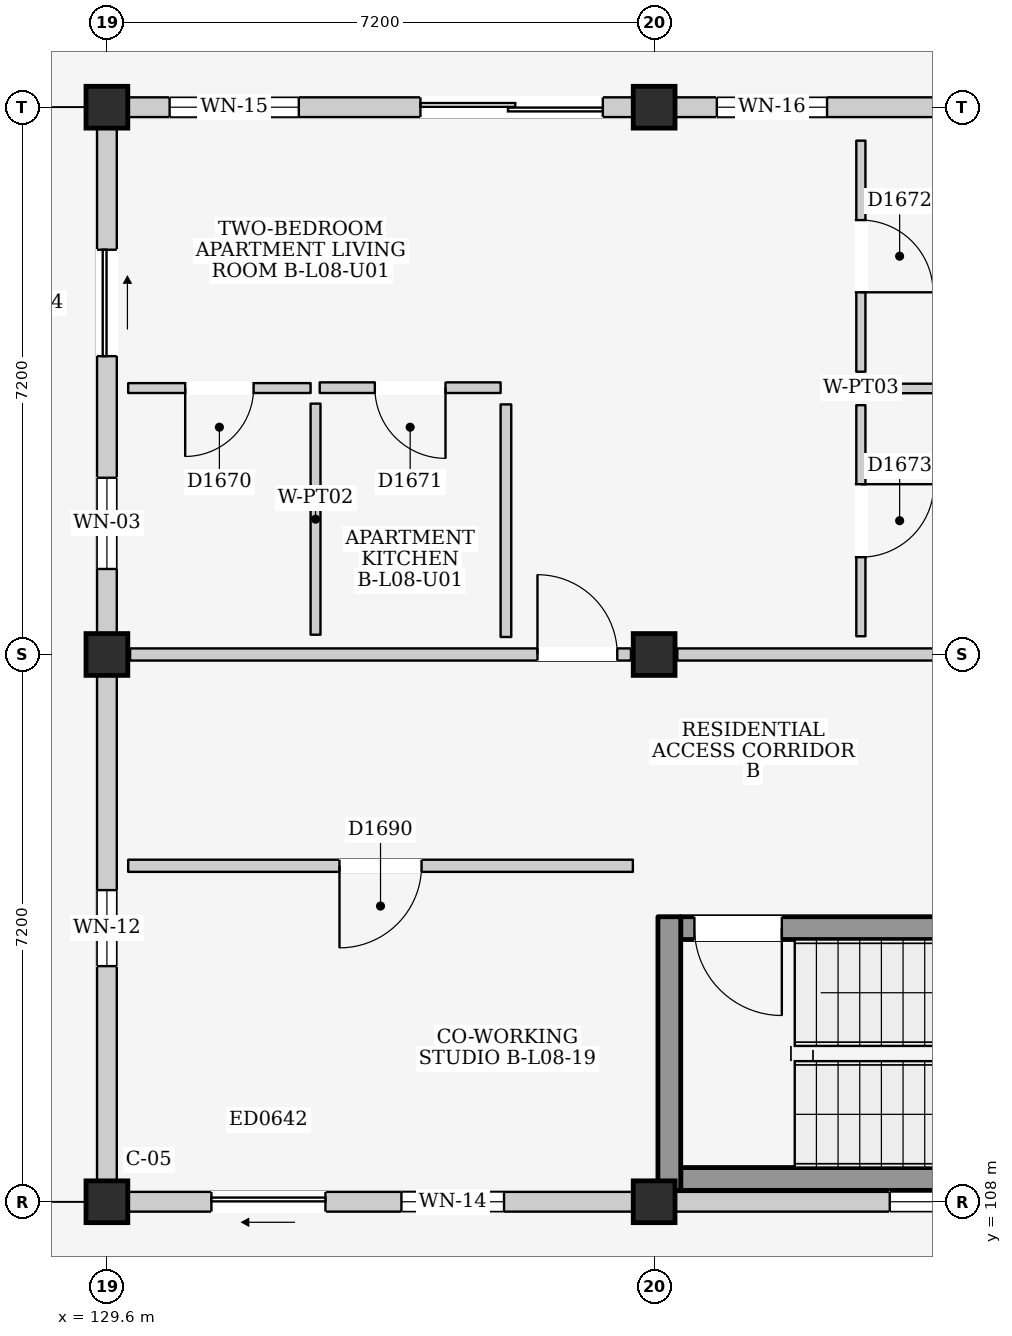
"""IFC4 building model, lengths in metres.
Left out: names, types, materials, properties, quantities, classifications, styles, units other than length and angle.
Written with IfcOpenShell. Run it as: python <this file> out.ifc"""

import sys

from ifc_helpers import new_model, si_unit, direction, frame, frame_2d, origin, origin_2d, place, context, subcontext, project, spatial, rectangle, extrude, element, fill, save


model = new_model("IFC4")
c1 = context("Model", 3, precision=1e-05, world=origin(), true_north=direction((0.0, 1.0)))
c2 = subcontext(c1, "Body", "Model", "MODEL_VIEW")
j1 = project(units=[si_unit("LENGTHUNIT", "METRE"), si_unit("PLANEANGLEUNIT", "RADIAN")], contexts=[c1])
p1 = place(None, origin())
s1 = spatial("IfcSite", under=j1, at=p1, CompositionType="ELEMENT")
p2 = place(p1, origin())
s2 = spatial("IfcBuilding", under=s1, at=p2, CompositionType="ELEMENT")
p3 = place(p2, frame((0.0, 0.0, 28.3)))
s3 = spatial("IfcBuildingStorey", under=s2, at=p3, CompositionType="ELEMENT", Elevation=28.3)
for number, where, z_axis, x_axis in (
    (1, (129.6, 108.0, 0.0), (0.0, 0.0, 1.0), (1.0, 0.0, 0.0)),
    (2, (129.6, 115.2, 0.0), (0.0, 0.0, 1.0), (1.0, 0.0, 0.0)),
    (3, (129.6, 122.4, 0.0), (0.0, 0.0, 1.0), (1.0, 0.0, 0.0)),
    (4, (136.8, 108.0, 0.0), (0.0, 0.0, 1.0), (1.0, 0.0, 0.0)),
    (5, (136.8, 115.2, 0.0), (0.0, 0.0, 1.0), (1.0, 0.0, 0.0)),
    (6, (136.8, 122.4, 0.0), (0.0, 0.0, 1.0), (1.0, 0.0, 0.0)),
):
    element("IfcColumn", number, at=place(p3, frame(where, z_axis=z_axis, x_axis=x_axis)), inside=s3, PredefinedType="COLUMN", context=c2, shape_type="SweptSolid", body=[
        extrude(rectangle(XDim=0.55, YDim=0.55, at=origin_2d()), origin(), (0.0, 0.0, 1.0), 3.2),
    ])
p4 = place(p3, frame((129.875, 108.0, 0.0), z_axis=(0.0, 0.0, 1.0), x_axis=(1.0, 0.0, 0.0)))
e7 = element("IfcWall", 7, at=p4, inside=s3, PredefinedType="ELEMENTEDWALL", context=c2, shape_type="SweptSolid", body=[
    extrude(rectangle(XDim=6.65, YDim=0.26, at=frame_2d((3.325, 0.0))), origin(), (0.0, 0.0, 1.0), 2.335),
])
p5 = place(p4, frame((1.1, 0.0, 0.0)))
e8 = element("IfcOpeningElement", 8, at=p5, cuts=e7, PredefinedType="OPENING", context=c2, shape_type="SweptSolid", body=[
    extrude(rectangle(XDim=1.5, YDim=2.12, at=frame_2d((0.75, 1.06))), frame((0.0, 0.145, 0.0), z_axis=(0.0, -1.0, 0.0), x_axis=(1.0, 0.0, 0.0)), (0.0, 0.0, 1.0), 0.29),
])
p6 = place(p4, frame((3.6, 0.0, 0.725)))
e9 = element("IfcOpeningElement", 9, at=p6, cuts=e7, PredefinedType="OPENING", context=c2, shape_type="SweptSolid", body=[
    extrude(rectangle(XDim=1.35, YDim=1.5, at=frame_2d((0.675, 0.75))), frame((0.0, 0.145, 0.0), z_axis=(0.0, -1.0, 0.0), x_axis=(1.0, 0.0, 0.0)), (0.0, 0.0, 1.0), 0.29),
])
p7 = place(p3, frame((129.6, 108.275, 0.0), z_axis=(0.0, 0.0, 1.0), x_axis=(0.0, 1.0, 0.0)))
e10 = element("IfcWall", 10, at=p7, inside=s3, PredefinedType="ELEMENTEDWALL", context=c2, shape_type="SweptSolid", body=[
    extrude(rectangle(XDim=6.65, YDim=0.26, at=frame_2d((3.325, 0.0))), origin(), (0.0, 0.0, 1.0), 2.435),
])
p8 = place(p7, frame((2.825, 0.0, 1.1)))
e11 = element("IfcOpeningElement", 11, at=p8, cuts=e10, PredefinedType="OPENING", context=c2, shape_type="SweptSolid", body=[
    extrude(rectangle(XDim=1.0, YDim=0.9, at=frame_2d((0.5, 0.45))), frame((0.0, 0.145, 0.0), z_axis=(0.0, -1.0, 0.0), x_axis=(1.0, 0.0, 0.0)), (0.0, 0.0, 1.0), 0.29),
])
p9 = place(p3, frame((129.875, 122.4, 0.0), z_axis=(0.0, 0.0, 1.0), x_axis=(1.0, 0.0, 0.0)))
e12 = element("IfcWall", 12, at=p9, inside=s3, PredefinedType="ELEMENTEDWALL", context=c2, shape_type="SweptSolid", body=[
    extrude(rectangle(XDim=6.65, YDim=0.26, at=frame_2d((3.325, 0.0))), origin(), (0.0, 0.0, 1.0), 2.485),
])
p10 = place(p9, frame((3.85, 0.0, 0.0)))
e13 = element("IfcOpeningElement", 13, at=p10, cuts=e12, PredefinedType="OPENING", context=c2, shape_type="SweptSolid", body=[
    extrude(rectangle(XDim=2.4, YDim=2.12, at=frame_2d((1.2, 1.06))), frame((0.0, 0.145, 0.0), z_axis=(0.0, -1.0, 0.0), x_axis=(1.0, 0.0, 0.0)), (0.0, 0.0, 1.0), 0.29),
])
p11 = place(p9, frame((0.55, 0.0, 0.9)))
e14 = element("IfcOpeningElement", 14, at=p11, cuts=e12, PredefinedType="OPENING", context=c2, shape_type="SweptSolid", body=[
    extrude(rectangle(XDim=1.7, YDim=1.45, at=frame_2d((0.85, 0.725))), frame((0.0, 0.145, 0.0), z_axis=(0.0, -1.0, 0.0), x_axis=(1.0, 0.0, 0.0)), (0.0, 0.0, 1.0), 0.29),
])
p12 = place(p3, frame((129.6, 115.475, 0.0), z_axis=(0.0, 0.0, 1.0), x_axis=(0.0, 1.0, 0.0)))
e15 = element("IfcWall", 15, at=p12, inside=s3, PredefinedType="ELEMENTEDWALL", context=c2, shape_type="SweptSolid", body=[
    extrude(rectangle(XDim=6.65, YDim=0.26, at=frame_2d((3.325, 0.0))), origin(), (0.0, 0.0, 1.0), 2.435),
])
p13 = place(p12, frame((3.65, 0.0, 0.0)))
e16 = element("IfcOpeningElement", 16, at=p13, cuts=e15, PredefinedType="OPENING", context=c2, shape_type="SweptSolid", body=[
    extrude(rectangle(XDim=1.4, YDim=2.1, at=frame_2d((0.7, 1.05))), frame((0.0, 0.145, 0.0), z_axis=(0.0, -1.0, 0.0), x_axis=(1.0, 0.0, 0.0)), (0.0, 0.0, 1.0), 0.29),
])
p14 = place(p12, frame((0.85, 0.0, 0.95)))
e17 = element("IfcOpeningElement", 17, at=p14, cuts=e15, PredefinedType="OPENING", context=c2, shape_type="SweptSolid", body=[
    extrude(rectangle(XDim=1.2, YDim=1.35, at=frame_2d((0.6, 0.675))), frame((0.0, 0.145, 0.0), z_axis=(0.0, -1.0, 0.0), x_axis=(1.0, 0.0, 0.0)), (0.0, 0.0, 1.0), 0.29),
])
p15 = place(p3, frame((137.075, 108.0, 0.0), z_axis=(0.0, 0.0, 1.0), x_axis=(1.0, 0.0, 0.0)))
e18 = element("IfcWall", 18, at=p15, inside=s3, PredefinedType="ELEMENTEDWALL", context=c2, shape_type="SweptSolid", body=[
    extrude(rectangle(XDim=6.65, YDim=0.26, at=frame_2d((3.325, 0.0))), origin(), (0.0, 0.0, 1.0), 2.335),
])
p16 = place(p15, frame((2.825, 0.0, 1.2)))
e19 = element("IfcOpeningElement", 19, at=p16, cuts=e18, PredefinedType="OPENING", context=c2, shape_type="SweptSolid", body=[
    extrude(rectangle(XDim=1.0, YDim=0.9, at=frame_2d((0.5, 0.45))), frame((0.0, 0.145, 0.0), z_axis=(0.0, -1.0, 0.0), x_axis=(1.0, 0.0, 0.0)), (0.0, 0.0, 1.0), 0.29),
])
p17 = place(p3, frame((137.075, 122.4, 0.0), z_axis=(0.0, 0.0, 1.0), x_axis=(1.0, 0.0, 0.0)))
e20 = element("IfcWall", 20, at=p17, inside=s3, PredefinedType="ELEMENTEDWALL", context=c2, shape_type="SweptSolid", body=[
    extrude(rectangle(XDim=6.65, YDim=0.26, at=frame_2d((3.325, 0.0))), origin(), (0.0, 0.0, 1.0), 2.485),
])
p18 = place(p17, frame((3.85, 0.0, 0.0)))
e21 = element("IfcOpeningElement", 21, at=p18, cuts=e20, PredefinedType="OPENING", context=c2, shape_type="SweptSolid", body=[
    extrude(rectangle(XDim=2.0, YDim=2.12, at=frame_2d((1.0, 1.06))), frame((0.0, 0.145, 0.0), z_axis=(0.0, -1.0, 0.0), x_axis=(1.0, 0.0, 0.0)), (0.0, 0.0, 1.0), 0.29),
])
p19 = place(p17, frame((0.55, 0.0, 0.9)))
e22 = element("IfcOpeningElement", 22, at=p19, cuts=e20, PredefinedType="OPENING", context=c2, shape_type="SweptSolid", body=[
    extrude(rectangle(XDim=1.45, YDim=1.4, at=frame_2d((0.725, 0.7))), frame((0.0, 0.145, 0.0), z_axis=(0.0, -1.0, 0.0), x_axis=(1.0, 0.0, 0.0)), (0.0, 0.0, 1.0), 0.29),
])
p20 = place(p3, frame((137.15, 108.3, 0.0), z_axis=(0.0, 0.0, 1.0), x_axis=(1.0, 0.0, 0.0)))
e23 = element("IfcWall", 23, at=p20, inside=s3, PredefinedType="SHEAR", context=c2, shape_type="SweptSolid", body=[
    extrude(rectangle(XDim=6.5, YDim=0.3, at=frame_2d((3.25, 0.0))), origin(), (0.0, 0.0, 1.0), 2.95),
])
p21 = place(p3, frame((137.15, 111.6, 0.0), z_axis=(0.0, 0.0, 1.0), x_axis=(1.0, 0.0, 0.0)))
e24 = element("IfcWall", 24, at=p21, inside=s3, PredefinedType="SHEAR", context=c2, shape_type="SweptSolid", body=[
    extrude(rectangle(XDim=6.5, YDim=0.3, at=frame_2d((3.25, 0.0))), origin(), (0.0, 0.0, 1.0), 2.95),
])
p22 = place(p21, frame((0.18, 0.0, 0.0)))
e25 = element("IfcOpeningElement", 25, at=p22, cuts=e24, PredefinedType="OPENING", context=c2, shape_type="SweptSolid", body=[
    extrude(rectangle(XDim=1.15, YDim=2.2, at=frame_2d((0.575, 1.1))), frame((0.0, 0.165, 0.0), z_axis=(0.0, -1.0, 0.0), x_axis=(1.0, 0.0, 0.0)), (0.0, 0.0, 1.0), 0.33),
])
p23 = place(p3, frame((137.0, 108.15, 0.0), z_axis=(0.0, 0.0, 1.0), x_axis=(0.0, 1.0, 0.0)))
e26 = element("IfcWall", 26, at=p23, inside=s3, PredefinedType="SHEAR", context=c2, shape_type="SweptSolid", body=[
    extrude(rectangle(XDim=3.6, YDim=0.3, at=frame_2d((1.8, 0.0))), origin(), (0.0, 0.0, 1.0), 2.95),
])
p24 = place(p3, frame((129.905, 115.2, 0.0), z_axis=(0.0, 0.0, 1.0), x_axis=(1.0, 0.0, 0.0)))
e27 = element("IfcWall", 27, at=p24, inside=s3, PredefinedType="PARTITIONING", context=c2, shape_type="SweptSolid", body=[
    extrude(rectangle(XDim=6.59, YDim=0.16, at=frame_2d((3.295, 0.0))), origin(), (0.0, 0.0, 1.0), 2.335),
])
p25 = place(p24, frame((5.36, 0.0, 0.0)))
e28 = element("IfcOpeningElement", 28, at=p25, cuts=e27, PredefinedType="OPENING", context=c2, shape_type="SweptSolid", body=[
    extrude(rectangle(XDim=1.05, YDim=2.15, at=frame_2d((0.525, 1.075))), frame((0.0, 0.095, 0.0), z_axis=(0.0, -1.0, 0.0), x_axis=(1.0, 0.0, 0.0)), (0.0, 0.0, 1.0), 0.19),
])
p26 = place(p3, frame((137.105, 115.2, 0.0), z_axis=(0.0, 0.0, 1.0), x_axis=(1.0, 0.0, 0.0)))
e29 = element("IfcWall", 29, at=p26, inside=s3, PredefinedType="PARTITIONING", context=c2, shape_type="SweptSolid", body=[
    extrude(rectangle(XDim=6.59, YDim=0.16, at=frame_2d((3.295, 0.0))), origin(), (0.0, 0.0, 1.0), 2.335),
])
p27 = place(p3, frame((129.88, 118.705, 0.0), z_axis=(0.0, 0.0, 1.0), x_axis=(1.0, 0.0, 0.0)))
e30 = element("IfcWall", 30, at=p27, inside=s3, PredefinedType="PARTITIONING", context=c2, shape_type="SweptSolid", body=[
    extrude(rectangle(XDim=2.4, YDim=0.13, at=frame_2d((1.2, 0.0))), origin(), (0.0, 0.0, 1.0), 2.95),
])
p28 = place(p27, frame((0.75, 0.0, 0.0)))
e31 = element("IfcOpeningElement", 31, at=p28, cuts=e30, PredefinedType="OPENING", context=c2, shape_type="SweptSolid", body=[
    extrude(rectangle(XDim=0.9, YDim=2.1, at=frame_2d((0.45, 1.05))), frame((0.0, 0.08, 0.0), z_axis=(0.0, -1.0, 0.0), x_axis=(1.0, 0.0, 0.0)), (0.0, 0.0, 1.0), 0.16),
])
p29 = place(p3, frame((132.345, 115.46, 0.0), z_axis=(0.0, 0.0, 1.0), x_axis=(0.0, 1.0, 0.0)))
e32 = element("IfcWall", 32, at=p29, inside=s3, PredefinedType="PARTITIONING", context=c2, shape_type="SweptSolid", body=[
    extrude(rectangle(XDim=3.04, YDim=0.13, at=frame_2d((1.52, 0.0))), origin(), (0.0, 0.0, 1.0), 2.95),
])
p30 = place(p3, frame((132.4, 118.71, 0.0), z_axis=(0.0, 0.0, 1.0), x_axis=(1.0, 0.0, 0.0)))
e33 = element("IfcWall", 33, at=p30, inside=s3, PredefinedType="PARTITIONING", context=c2, shape_type="SweptSolid", body=[
    extrude(rectangle(XDim=2.38, YDim=0.14, at=frame_2d((1.19, 0.0))), origin(), (0.0, 0.0, 1.0), 2.95),
])
p31 = place(p30, frame((0.725, 0.0, 0.0)))
e34 = element("IfcOpeningElement", 34, at=p31, cuts=e33, PredefinedType="OPENING", context=c2, shape_type="SweptSolid", body=[
    extrude(rectangle(XDim=0.93, YDim=2.14, at=frame_2d((0.465, 1.07))), frame((0.0, 0.085, 0.0), z_axis=(0.0, -1.0, 0.0), x_axis=(1.0, 0.0, 0.0)), (0.0, 0.0, 1.0), 0.17),
])
p32 = place(p3, frame((134.85, 115.43, 0.0), z_axis=(0.0, 0.0, 1.0), x_axis=(0.0, 1.0, 0.0)))
e35 = element("IfcWall", 35, at=p32, inside=s3, PredefinedType="PARTITIONING", context=c2, shape_type="SweptSolid", body=[
    extrude(rectangle(XDim=3.06, YDim=0.14, at=frame_2d((1.53, 0.0))), origin(), (0.0, 0.0, 1.0), 2.95),
])
p33 = place(p3, frame((139.52, 118.92, 0.0), z_axis=(0.0, 0.0, 1.0), x_axis=(0.0, 1.0, 0.0)))
e36 = element("IfcWall", 36, at=p33, inside=s3, PredefinedType="PARTITIONING", context=c2, shape_type="SweptSolid", body=[
    extrude(rectangle(XDim=3.04, YDim=0.12, at=frame_2d((1.52, 0.0))), origin(), (0.0, 0.0, 1.0), 2.95),
])
p34 = place(p33, frame((1.045, 0.0, 0.0)))
e37 = element("IfcOpeningElement", 37, at=p34, cuts=e36, PredefinedType="OPENING", context=c2, shape_type="SweptSolid", body=[
    extrude(rectangle(XDim=0.95, YDim=2.15, at=frame_2d((0.475, 1.075))), frame((0.0, 0.075, 0.0), z_axis=(0.0, -1.0, 0.0), x_axis=(1.0, 0.0, 0.0)), (0.0, 0.0, 1.0), 0.15),
])
p35 = place(p3, frame((139.72, 118.7, 0.0), z_axis=(0.0, 0.0, 1.0), x_axis=(1.0, 0.0, 0.0)))
e38 = element("IfcWall", 38, at=p35, inside=s3, PredefinedType="PARTITIONING", context=c2, shape_type="SweptSolid", body=[
    extrude(rectangle(XDim=4.06, YDim=0.125, at=frame_2d((2.03, 0.0))), origin(), (0.0, 0.0, 1.0), 2.95),
])
p36 = place(p3, frame((139.52, 115.44, 0.0), z_axis=(0.0, 0.0, 1.0), x_axis=(0.0, 1.0, 0.0)))
e39 = element("IfcWall", 39, at=p36, inside=s3, PredefinedType="PARTITIONING", context=c2, shape_type="SweptSolid", body=[
    extrude(rectangle(XDim=3.04, YDim=0.12, at=frame_2d((1.52, 0.0))), origin(), (0.0, 0.0, 1.0), 2.95),
])
p37 = place(p36, frame((1.04, 0.0, 0.0)))
e40 = element("IfcOpeningElement", 40, at=p37, cuts=e39, PredefinedType="OPENING", context=c2, shape_type="SweptSolid", body=[
    extrude(rectangle(XDim=0.96, YDim=2.15, at=frame_2d((0.48, 1.075))), frame((0.0, 0.075, 0.0), z_axis=(0.0, -1.0, 0.0), x_axis=(1.0, 0.0, 0.0)), (0.0, 0.0, 1.0), 0.15),
])
p38 = place(p3, frame((129.88, 112.42, 0.0), z_axis=(0.0, 0.0, 1.0), x_axis=(1.0, 0.0, 0.0)))
e41 = element("IfcWall", 41, at=p38, inside=s3, PredefinedType="PARTITIONING", context=c2, shape_type="SweptSolid", body=[
    extrude(rectangle(XDim=6.64, YDim=0.16, at=frame_2d((3.32, 0.0))), origin(), (0.0, 0.0, 1.0), 2.95),
])
p39 = place(p38, frame((2.78, 0.0, 0.0)))
e42 = element("IfcOpeningElement", 42, at=p39, cuts=e41, PredefinedType="OPENING", context=c2, shape_type="SweptSolid", body=[
    extrude(rectangle(XDim=1.08, YDim=2.22, at=frame_2d((0.54, 1.11))), frame((0.0, 0.095, 0.0), z_axis=(0.0, -1.0, 0.0), x_axis=(1.0, 0.0, 0.0)), (0.0, 0.0, 1.0), 0.19),
])
p40 = place(p5, frame((1.5, 0.0, 0.0), z_axis=(0.0, 0.0, 1.0), x_axis=(-1.0, 0.0, 0.0)))
e43 = element("IfcDoor", 43, at=p40, inside=s3, OperationType="SLIDING_TO_LEFT", PredefinedType="DOOR", context=c2, shape_type="SweptSolid", body=[
    extrude(rectangle(XDim=1.5, YDim=2.12, at=frame_2d((0.75, 1.06))), frame((0.0, 0.025, 0.0), z_axis=(0.0, -1.0, 0.0), x_axis=(1.0, 0.0, 0.0)), (0.0, 0.0, 1.0), 0.05),
])
fill(e8, e43)
p41 = place(p6, origin())
e44 = element("IfcWindow", 44, at=p41, inside=s3, PartitioningType="SINGLE_PANEL", PredefinedType="WINDOW", context=c2, shape_type="SweptSolid", body=[
    extrude(rectangle(XDim=1.35, YDim=1.5, at=frame_2d((0.675, 0.75))), frame((0.0, 0.03, 0.0), z_axis=(0.0, -1.0, 0.0), x_axis=(1.0, 0.0, 0.0)), (0.0, 0.0, 1.0), 0.06),
])
fill(e9, e44)
p42 = place(p8, origin())
e45 = element("IfcWindow", 45, at=p42, inside=s3, PartitioningType="SINGLE_PANEL", PredefinedType="WINDOW", context=c2, shape_type="SweptSolid", body=[
    extrude(rectangle(XDim=1.0, YDim=0.9, at=frame_2d((0.5, 0.45))), frame((0.0, 0.03, 0.0), z_axis=(0.0, -1.0, 0.0), x_axis=(1.0, 0.0, 0.0)), (0.0, 0.0, 1.0), 0.06),
])
fill(e11, e45)
p43 = place(p10, frame((2.4, 0.0, 0.0), z_axis=(0.0, 0.0, 1.0), x_axis=(-1.0, 0.0, 0.0)))
e46 = element("IfcDoor", 46, at=p43, inside=s3, OperationType="DOUBLE_DOOR_SLIDING", PredefinedType="DOOR", context=c2, shape_type="SweptSolid", body=[
    extrude(rectangle(XDim=2.4, YDim=2.12, at=frame_2d((1.2, 1.06))), frame((0.0, 0.025, 0.0), z_axis=(0.0, -1.0, 0.0), x_axis=(1.0, 0.0, 0.0)), (0.0, 0.0, 1.0), 0.05),
])
fill(e13, e46)
p44 = place(p11, origin())
e47 = element("IfcWindow", 47, at=p44, inside=s3, PartitioningType="DOUBLE_PANEL_VERTICAL", PredefinedType="WINDOW", context=c2, shape_type="SweptSolid", body=[
    extrude(rectangle(XDim=1.7, YDim=1.45, at=frame_2d((0.85, 0.725))), frame((0.0, 0.03, 0.0), z_axis=(0.0, -1.0, 0.0), x_axis=(1.0, 0.0, 0.0)), (0.0, 0.0, 1.0), 0.06),
])
fill(e14, e47)
p45 = place(p13, frame((1.4, 0.0, 0.0), z_axis=(0.0, 0.0, 1.0), x_axis=(-1.0, 0.0, 0.0)))
e48 = element("IfcDoor", 48, at=p45, inside=s3, OperationType="SLIDING_TO_RIGHT", PredefinedType="DOOR", context=c2, shape_type="SweptSolid", body=[
    extrude(rectangle(XDim=1.4, YDim=2.1, at=frame_2d((0.7, 1.05))), frame((0.0, 0.025, 0.0), z_axis=(0.0, -1.0, 0.0), x_axis=(1.0, 0.0, 0.0)), (0.0, 0.0, 1.0), 0.05),
])
fill(e16, e48)
p46 = place(p14, origin())
e49 = element("IfcWindow", 49, at=p46, inside=s3, PartitioningType="SINGLE_PANEL", PredefinedType="WINDOW", context=c2, shape_type="SweptSolid", body=[
    extrude(rectangle(XDim=1.2, YDim=1.35, at=frame_2d((0.6, 0.675))), frame((0.0, 0.03, 0.0), z_axis=(0.0, -1.0, 0.0), x_axis=(1.0, 0.0, 0.0)), (0.0, 0.0, 1.0), 0.06),
])
fill(e17, e49)
p47 = place(p16, origin())
e50 = element("IfcWindow", 50, at=p47, inside=s3, PartitioningType="SINGLE_PANEL", PredefinedType="WINDOW", context=c2, shape_type="SweptSolid", body=[
    extrude(rectangle(XDim=1.0, YDim=0.9, at=frame_2d((0.5, 0.45))), frame((0.0, 0.03, 0.0), z_axis=(0.0, -1.0, 0.0), x_axis=(1.0, 0.0, 0.0)), (0.0, 0.0, 1.0), 0.06),
])
fill(e19, e50)
p48 = place(p19, origin())
e51 = element("IfcWindow", 51, at=p48, inside=s3, PartitioningType="DOUBLE_PANEL_VERTICAL", PredefinedType="WINDOW", context=c2, shape_type="SweptSolid", body=[
    extrude(rectangle(XDim=1.45, YDim=1.4, at=frame_2d((0.725, 0.7))), frame((0.0, 0.03, 0.0), z_axis=(0.0, -1.0, 0.0), x_axis=(1.0, 0.0, 0.0)), (0.0, 0.0, 1.0), 0.06),
])
fill(e22, e51)
p49 = place(p22, frame((1.15, 0.0, 0.0), z_axis=(0.0, 0.0, 1.0), x_axis=(-1.0, 0.0, 0.0)))
e52 = element("IfcDoor", 52, at=p49, inside=s3, OperationType="SINGLE_SWING_LEFT", PredefinedType="DOOR", context=c2, shape_type="SweptSolid", body=[
    extrude(rectangle(XDim=1.15, YDim=2.2, at=frame_2d((0.575, 1.1))), frame((0.0, 0.025, 0.0), z_axis=(0.0, -1.0, 0.0), x_axis=(1.0, 0.0, 0.0)), (0.0, 0.0, 1.0), 0.05),
])
fill(e25, e52)
p50 = place(p25, origin())
e53 = element("IfcDoor", 53, at=p50, inside=s3, OperationType="SINGLE_SWING_LEFT", PredefinedType="DOOR", context=c2, shape_type="SweptSolid", body=[
    extrude(rectangle(XDim=1.05, YDim=2.15, at=frame_2d((0.525, 1.075))), frame((0.0, 0.025, 0.0), z_axis=(0.0, -1.0, 0.0), x_axis=(1.0, 0.0, 0.0)), (0.0, 0.0, 1.0), 0.05),
])
fill(e28, e53)
p51 = place(p28, frame((0.9, 0.0, 0.0), z_axis=(0.0, 0.0, 1.0), x_axis=(-1.0, 0.0, 0.0)))
e54 = element("IfcDoor", 54, at=p51, inside=s3, OperationType="SINGLE_SWING_RIGHT", PredefinedType="DOOR", context=c2, shape_type="SweptSolid", body=[
    extrude(rectangle(XDim=0.9, YDim=2.1, at=frame_2d((0.45, 1.05))), frame((0.0, 0.025, 0.0), z_axis=(0.0, -1.0, 0.0), x_axis=(1.0, 0.0, 0.0)), (0.0, 0.0, 1.0), 0.05),
])
fill(e31, e54)
p52 = place(p31, frame((0.93, 0.0, 0.0), z_axis=(0.0, 0.0, 1.0), x_axis=(-1.0, 0.0, 0.0)))
e55 = element("IfcDoor", 55, at=p52, inside=s3, OperationType="SINGLE_SWING_LEFT", PredefinedType="DOOR", context=c2, shape_type="SweptSolid", body=[
    extrude(rectangle(XDim=0.93, YDim=2.14, at=frame_2d((0.465, 1.07))), frame((0.0, 0.025, 0.0), z_axis=(0.0, -1.0, 0.0), x_axis=(1.0, 0.0, 0.0)), (0.0, 0.0, 1.0), 0.05),
])
fill(e34, e55)
p53 = place(p34, frame((0.95, 0.0, 0.0), z_axis=(0.0, 0.0, 1.0), x_axis=(-1.0, 0.0, 0.0)))
e56 = element("IfcDoor", 56, at=p53, inside=s3, OperationType="SINGLE_SWING_RIGHT", PredefinedType="DOOR", context=c2, shape_type="SweptSolid", body=[
    extrude(rectangle(XDim=0.95, YDim=2.15, at=frame_2d((0.475, 1.075))), frame((0.0, 0.025, 0.0), z_axis=(0.0, -1.0, 0.0), x_axis=(1.0, 0.0, 0.0)), (0.0, 0.0, 1.0), 0.05),
])
fill(e37, e56)
p54 = place(p37, frame((0.96, 0.0, 0.0), z_axis=(0.0, 0.0, 1.0), x_axis=(-1.0, 0.0, 0.0)))
e57 = element("IfcDoor", 57, at=p54, inside=s3, OperationType="SINGLE_SWING_LEFT", PredefinedType="DOOR", context=c2, shape_type="SweptSolid", body=[
    extrude(rectangle(XDim=0.96, YDim=2.15, at=frame_2d((0.48, 1.075))), frame((0.0, 0.025, 0.0), z_axis=(0.0, -1.0, 0.0), x_axis=(1.0, 0.0, 0.0)), (0.0, 0.0, 1.0), 0.05),
])
fill(e40, e57)
p55 = place(p39, frame((1.08, 0.0, 0.0), z_axis=(0.0, 0.0, 1.0), x_axis=(-1.0, 0.0, 0.0)))
e58 = element("IfcDoor", 58, at=p55, inside=s3, OperationType="SINGLE_SWING_RIGHT", PredefinedType="DOOR", context=c2, shape_type="SweptSolid", body=[
    extrude(rectangle(XDim=1.08, YDim=2.22, at=frame_2d((0.54, 1.11))), frame((0.0, 0.025, 0.0), z_axis=(0.0, -1.0, 0.0), x_axis=(1.0, 0.0, 0.0)), (0.0, 0.0, 1.0), 0.05),
])
fill(e42, e58)
save(model, sys.argv[1])
